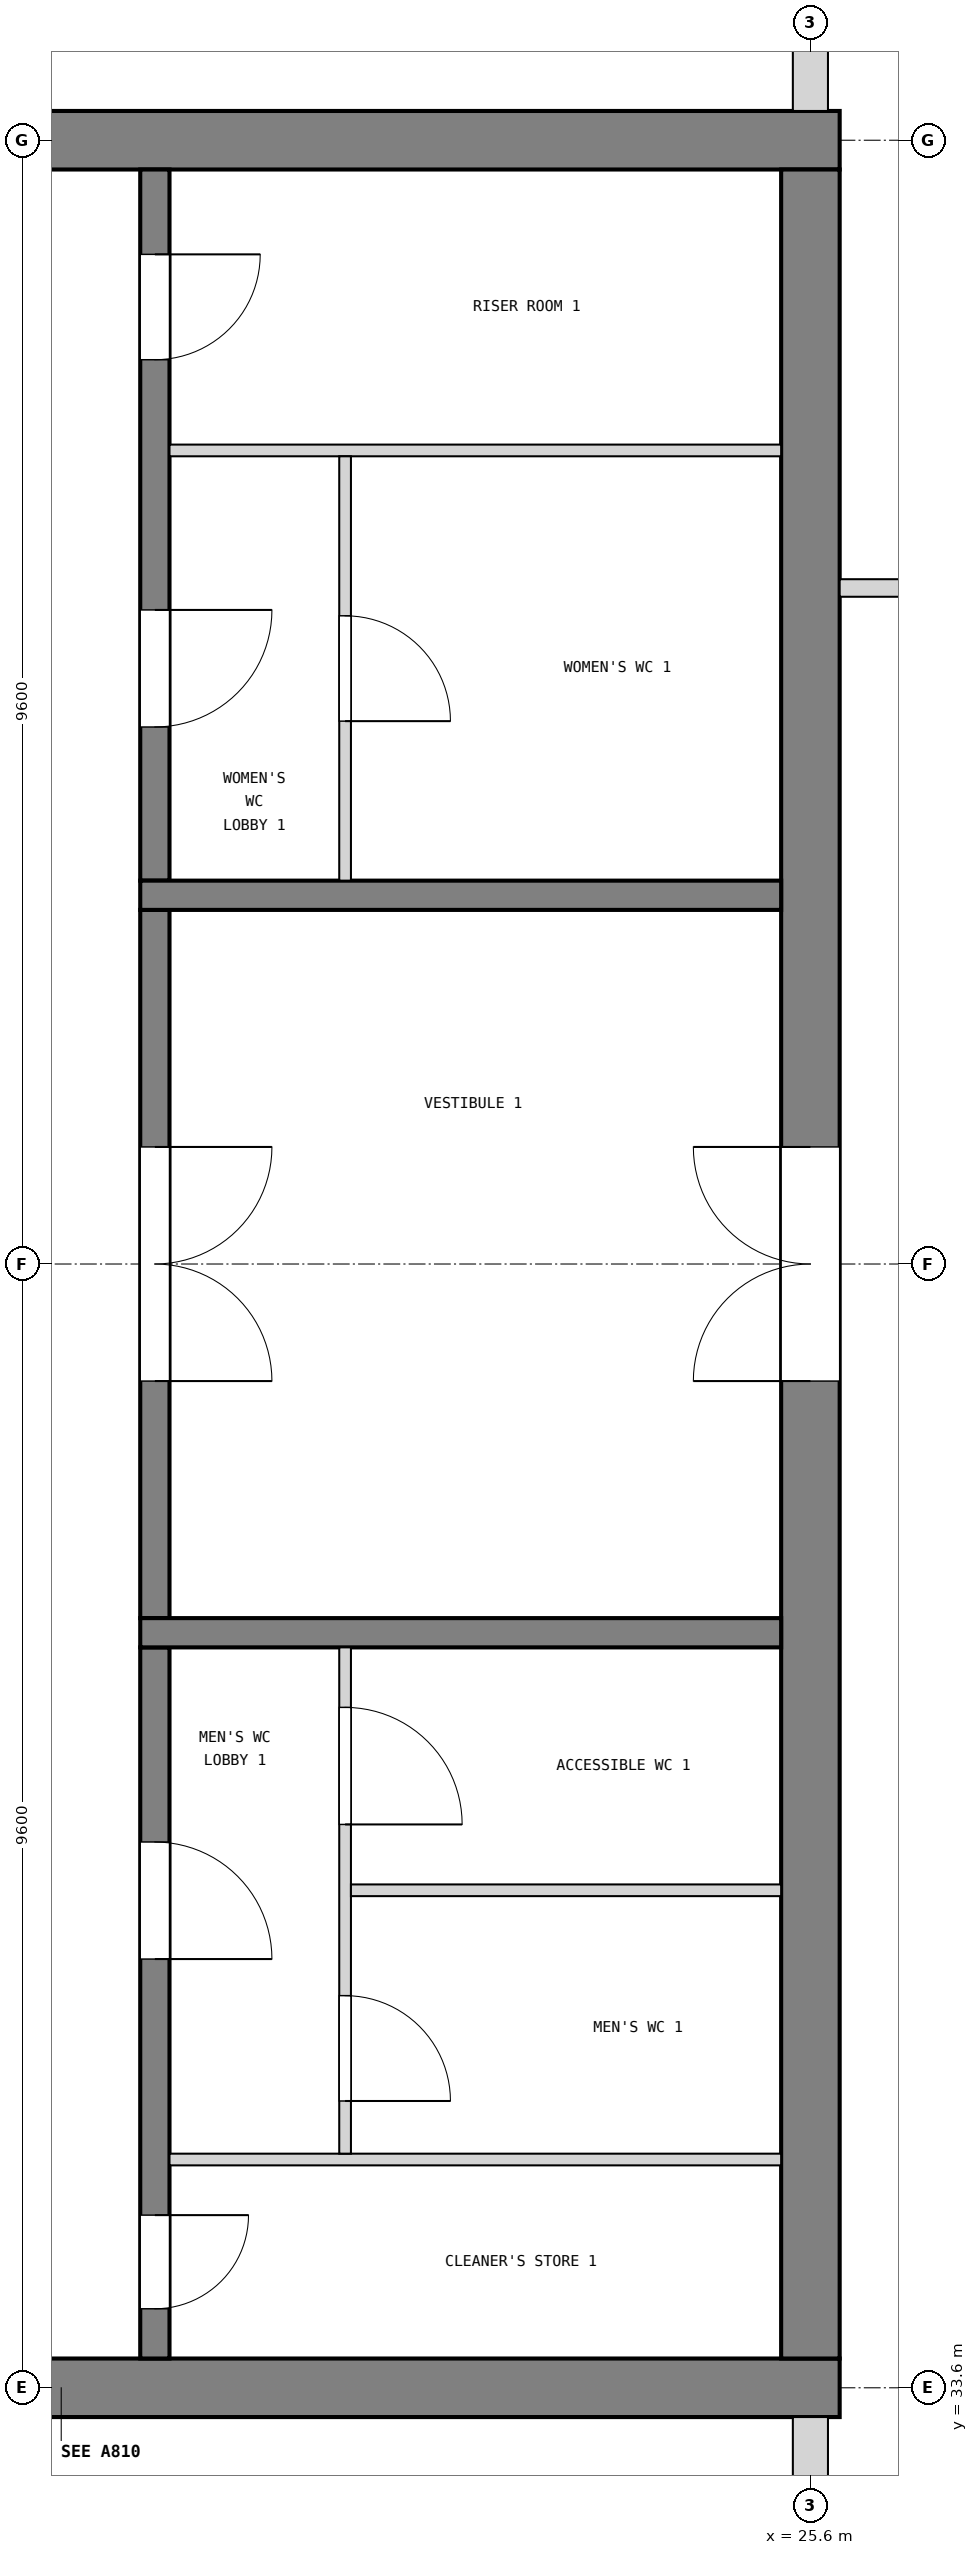
"""IFC4 building model, lengths in metres.
Left out: names, types, materials, properties, quantities, classifications, styles, units other than length and angle.
Written with IfcOpenShell. Run it as: python <this file> out.ifc"""

import sys

from ifc_helpers import new_model, si_unit, direction, frame, frame_2d, origin, place, context, subcontext, project, spatial, rectangle, extrude, element, fill, save


model = new_model("IFC4")
c1 = context("Model", 3, precision=1e-05, world=origin(), true_north=direction((0.0, 1.0)))
c2 = subcontext(c1, "Body", "Model", "MODEL_VIEW")
j1 = project(units=[si_unit("LENGTHUNIT", "METRE"), si_unit("PLANEANGLEUNIT", "RADIAN")], contexts=[c1])
p1 = place(None, origin())
s1 = spatial("IfcSite", under=j1, at=p1, CompositionType="ELEMENT")
p2 = place(p1, origin())
s2 = spatial("IfcBuilding", under=s1, at=p2, CompositionType="ELEMENT")
p3 = place(p2, frame((0.0, 0.0, 32.7)))
s3 = spatial("IfcBuildingStorey", under=s2, at=p3, CompositionType="ELEMENT", Elevation=32.7)
p4 = place(p3, frame((12.55, 52.8, 0.0), z_axis=(0.0, 0.0, 1.0), x_axis=(1.0, 0.0, 0.0)))
e1 = element("IfcWall", 1, at=p4, inside=s3, PredefinedType="SHEAR", context=c2, shape_type="SweptSolid", body=[
    extrude(rectangle(XDim=13.3, YDim=0.5, at=frame_2d((6.65, 0.0))), origin(), (0.0, 0.0, 1.0), 3.9),
])
p5 = place(p4, frame((1.85, 0.0, 1.0)))
e2 = element("IfcOpeningElement", 2, at=p5, cuts=e1, PredefinedType="OPENING", context=c2, shape_type="SweptSolid", body=[
    extrude(rectangle(XDim=0.4, YDim=2.0, at=frame_2d((0.2, 1.0))), frame((0.0, 0.26, 0.0), z_axis=(0.0, -1.0, 0.0), x_axis=(1.0, 0.0, 0.0)), (0.0, 0.0, 1.0), 0.52),
])
p6 = place(p3, frame((12.55, 33.6, 0.0), z_axis=(0.0, 0.0, 1.0), x_axis=(1.0, 0.0, 0.0)))
e3 = element("IfcWall", 3, at=p6, inside=s3, PredefinedType="SHEAR", context=c2, shape_type="SweptSolid", body=[
    extrude(rectangle(XDim=13.3, YDim=0.5, at=frame_2d((6.65, 0.0))), origin(), (0.0, 0.0, 1.0), 3.9),
])
p7 = place(p6, frame((1.85, 0.0, 1.0)))
e4 = element("IfcOpeningElement", 4, at=p7, cuts=e3, PredefinedType="OPENING", context=c2, shape_type="SweptSolid", body=[
    extrude(rectangle(XDim=0.4, YDim=2.0, at=frame_2d((0.2, 1.0))), frame((0.0, 0.26, 0.0), z_axis=(0.0, -1.0, 0.0), x_axis=(1.0, 0.0, 0.0)), (0.0, 0.0, 1.0), 0.52),
])
p8 = place(p3, frame((25.6, 33.85, 0.0), z_axis=(0.0, 0.0, 1.0), x_axis=(0.0, 1.0, 0.0)))
e5 = element("IfcWall", 5, at=p8, inside=s3, PredefinedType="SHEAR", context=c2, shape_type="SweptSolid", body=[
    extrude(rectangle(XDim=18.7, YDim=0.5, at=frame_2d((9.35, 0.0))), origin(), (0.0, 0.0, 1.0), 3.9),
])
p9 = place(p8, frame((8.35, 0.0, 0.0)))
e6 = element("IfcOpeningElement", 6, at=p9, cuts=e5, PredefinedType="OPENING", context=c2, shape_type="SweptSolid", body=[
    extrude(rectangle(XDim=2.0, YDim=2.1, at=frame_2d((1.0, 1.05))), frame((0.0, 0.26, 0.0), z_axis=(0.0, -1.0, 0.0), x_axis=(1.0, 0.0, 0.0)), (0.0, 0.0, 1.0), 0.52),
])
p10 = place(p3, frame((25.6, 31.0, 0.0), z_axis=(0.0, 0.0, 1.0), x_axis=(0.0, 1.0, 0.0)))
e7 = element("IfcWall", 7, at=p10, inside=s3, PredefinedType="SOLIDWALL", context=c2, shape_type="SweptSolid", body=[
    extrude(rectangle(XDim=2.35, YDim=0.3, at=frame_2d((1.175, 0.0))), origin(), (0.0, 0.0, 1.0), 2.88),
])
p11 = place(p3, frame((25.6, 53.05, 0.0), z_axis=(0.0, 0.0, 1.0), x_axis=(0.0, 1.0, 0.0)))
e8 = element("IfcWall", 8, at=p11, inside=s3, PredefinedType="SOLIDWALL", context=c2, shape_type="SweptSolid", body=[
    extrude(rectangle(XDim=2.35, YDim=0.3, at=frame_2d((1.175, 0.0))), origin(), (0.0, 0.0, 1.0), 2.88),
])
p12 = place(p3, frame((20.0, 33.85, 0.0), z_axis=(0.0, 0.0, 1.0), x_axis=(0.0, 1.0, 0.0)))
e9 = element("IfcWall", 9, at=p12, inside=s3, PredefinedType="SOLIDWALL", context=c2, shape_type="SweptSolid", body=[
    extrude(rectangle(XDim=6.075, YDim=0.25, at=frame_2d((3.038, 0.0))), origin(), (0.0, 0.0, 1.0), 3.6),
])
p13 = place(p12, frame((0.425, 0.0, 0.0)))
e10 = element("IfcOpeningElement", 10, at=p13, cuts=e9, PredefinedType="OPENING", context=c2, shape_type="SweptSolid", body=[
    extrude(rectangle(XDim=0.8, YDim=2.1, at=frame_2d((0.4, 1.05))), frame((0.0, 0.135, 0.0), z_axis=(0.0, -1.0, 0.0), x_axis=(1.0, 0.0, 0.0)), (0.0, 0.0, 1.0), 0.27),
])
p14 = place(p12, frame((3.413, 0.0, 0.0)))
e11 = element("IfcOpeningElement", 11, at=p14, cuts=e9, PredefinedType="OPENING", context=c2, shape_type="SweptSolid", body=[
    extrude(rectangle(XDim=1.0, YDim=2.1, at=frame_2d((0.5, 1.05))), frame((0.0, 0.135, 0.0), z_axis=(0.0, -1.0, 0.0), x_axis=(1.0, 0.0, 0.0)), (0.0, 0.0, 1.0), 0.27),
])
p15 = place(p3, frame((20.0, 40.175, 0.0), z_axis=(0.0, 0.0, 1.0), x_axis=(0.0, 1.0, 0.0)))
e12 = element("IfcWall", 12, at=p15, inside=s3, PredefinedType="SOLIDWALL", context=c2, shape_type="SweptSolid", body=[
    extrude(rectangle(XDim=6.05, YDim=0.25, at=frame_2d((3.025, 0.0))), origin(), (0.0, 0.0, 1.0), 3.6),
])
p16 = place(p15, frame((2.025, 0.0, 0.0)))
e13 = element("IfcOpeningElement", 13, at=p16, cuts=e12, PredefinedType="OPENING", context=c2, shape_type="SweptSolid", body=[
    extrude(rectangle(XDim=2.0, YDim=2.1, at=frame_2d((1.0, 1.05))), frame((0.0, 0.135, 0.0), z_axis=(0.0, -1.0, 0.0), x_axis=(1.0, 0.0, 0.0)), (0.0, 0.0, 1.0), 0.27),
])
p17 = place(p3, frame((20.0, 46.475, 0.0), z_axis=(0.0, 0.0, 1.0), x_axis=(0.0, 1.0, 0.0)))
e14 = element("IfcWall", 14, at=p17, inside=s3, PredefinedType="SOLIDWALL", context=c2, shape_type="SweptSolid", body=[
    extrude(rectangle(XDim=6.075, YDim=0.25, at=frame_2d((3.038, 0.0))), origin(), (0.0, 0.0, 1.0), 3.6),
])
p18 = place(p17, frame((1.312, 0.0, 0.0)))
e15 = element("IfcOpeningElement", 15, at=p18, cuts=e14, PredefinedType="OPENING", context=c2, shape_type="SweptSolid", body=[
    extrude(rectangle(XDim=1.0, YDim=2.1, at=frame_2d((0.5, 1.05))), frame((0.0, 0.135, 0.0), z_axis=(0.0, -1.0, 0.0), x_axis=(1.0, 0.0, 0.0)), (0.0, 0.0, 1.0), 0.27),
])
p19 = place(p17, frame((4.45, 0.0, 0.0)))
e16 = element("IfcOpeningElement", 16, at=p19, cuts=e14, PredefinedType="OPENING", context=c2, shape_type="SweptSolid", body=[
    extrude(rectangle(XDim=0.9, YDim=2.1, at=frame_2d((0.45, 1.05))), frame((0.0, 0.135, 0.0), z_axis=(0.0, -1.0, 0.0), x_axis=(1.0, 0.0, 0.0)), (0.0, 0.0, 1.0), 0.27),
])
for number, where, z_axis, x_axis in (
    (17, (19.875, 40.05, 0.0), (0.0, 0.0, 1.0), (1.0, 0.0, 0.0)),
    (18, (19.875, 46.35, 0.0), (0.0, 0.0, 1.0), (1.0, 0.0, 0.0)),
):
    element("IfcWall", number, at=place(p3, frame(where, z_axis=z_axis, x_axis=x_axis)), inside=s3, PredefinedType="SOLIDWALL", context=c2, shape_type="SweptSolid", body=[
        extrude(rectangle(XDim=5.475, YDim=0.25, at=frame_2d((2.738, 0.0))), origin(), (0.0, 0.0, 1.0), 3.6),
    ])
p20 = place(p3, frame((20.125, 35.55, 0.0), z_axis=(0.0, 0.0, 1.0), x_axis=(1.0, 0.0, 0.0)))
e19 = element("IfcWall", 19, at=p20, inside=s3, PredefinedType="PARTITIONING", context=c2, shape_type="SweptSolid", body=[
    extrude(rectangle(XDim=5.225, YDim=0.1, at=frame_2d((2.613, 0.0))), origin(), (0.0, 0.0, 1.0), 3.6),
])
p21 = place(p3, frame((21.625, 35.6, 0.0), z_axis=(0.0, 0.0, 1.0), x_axis=(0.0, 1.0, 0.0)))
e20 = element("IfcWall", 20, at=p21, inside=s3, PredefinedType="PARTITIONING", context=c2, shape_type="SweptSolid", body=[
    extrude(rectangle(XDim=4.325, YDim=0.1, at=frame_2d((2.163, 0.0))), origin(), (0.0, 0.0, 1.0), 3.6),
])
p22 = place(p21, frame((0.45, 0.0, 0.0)))
e21 = element("IfcOpeningElement", 21, at=p22, cuts=e20, PredefinedType="OPENING", context=c2, shape_type="SweptSolid", body=[
    extrude(rectangle(XDim=0.9, YDim=2.1, at=frame_2d((0.45, 1.05))), frame((0.0, 0.06, 0.0), z_axis=(0.0, -1.0, 0.0), x_axis=(1.0, 0.0, 0.0)), (0.0, 0.0, 1.0), 0.12),
])
p23 = place(p21, frame((2.812, 0.0, 0.0)))
e22 = element("IfcOpeningElement", 22, at=p23, cuts=e20, PredefinedType="OPENING", context=c2, shape_type="SweptSolid", body=[
    extrude(rectangle(XDim=1.0, YDim=2.1, at=frame_2d((0.5, 1.05))), frame((0.0, 0.06, 0.0), z_axis=(0.0, -1.0, 0.0), x_axis=(1.0, 0.0, 0.0)), (0.0, 0.0, 1.0), 0.12),
])
p24 = place(p3, frame((21.675, 37.85, 0.0), z_axis=(0.0, 0.0, 1.0), x_axis=(1.0, 0.0, 0.0)))
e23 = element("IfcWall", 23, at=p24, inside=s3, PredefinedType="PARTITIONING", context=c2, shape_type="SweptSolid", body=[
    extrude(rectangle(XDim=3.675, YDim=0.1, at=frame_2d((1.837, 0.0))), origin(), (0.0, 0.0, 1.0), 3.6),
])
p25 = place(p3, frame((20.125, 50.15, 0.0), z_axis=(0.0, 0.0, 1.0), x_axis=(1.0, 0.0, 0.0)))
e24 = element("IfcWall", 24, at=p25, inside=s3, PredefinedType="PARTITIONING", context=c2, shape_type="SweptSolid", body=[
    extrude(rectangle(XDim=5.225, YDim=0.1, at=frame_2d((2.613, 0.0))), origin(), (0.0, 0.0, 1.0), 3.6),
])
p26 = place(p3, frame((21.625, 46.475, 0.0), z_axis=(0.0, 0.0, 1.0), x_axis=(0.0, 1.0, 0.0)))
e25 = element("IfcWall", 25, at=p26, inside=s3, PredefinedType="PARTITIONING", context=c2, shape_type="SweptSolid", body=[
    extrude(rectangle(XDim=3.625, YDim=0.1, at=frame_2d((1.812, 0.0))), origin(), (0.0, 0.0, 1.0), 3.6),
])
p27 = place(p26, frame((1.363, 0.0, 0.0)))
e26 = element("IfcOpeningElement", 26, at=p27, cuts=e25, PredefinedType="OPENING", context=c2, shape_type="SweptSolid", body=[
    extrude(rectangle(XDim=0.9, YDim=2.1, at=frame_2d((0.45, 1.05))), frame((0.0, 0.06, 0.0), z_axis=(0.0, -1.0, 0.0), x_axis=(1.0, 0.0, 0.0)), (0.0, 0.0, 1.0), 0.12),
])
p28 = place(p3, frame((25.85, 48.975, 0.0), z_axis=(0.0, 0.0, 1.0), x_axis=(1.0, 0.0, 0.0)))
e27 = element("IfcWall", 27, at=p28, inside=s3, PredefinedType="PARTITIONING", context=c2, shape_type="SweptSolid", body=[
    extrude(rectangle(XDim=5.97, YDim=0.15, at=frame_2d((2.985, 0.0))), origin(), (0.0, 0.0, 1.0), 3.68),
])
p29 = place(p28, frame((2.45, 0.0, 0.0)))
e28 = element("IfcOpeningElement", 28, at=p29, cuts=e27, PredefinedType="OPENING", context=c2, shape_type="SweptSolid", body=[
    extrude(rectangle(XDim=1.0, YDim=2.1, at=frame_2d((0.5, 1.05))), frame((0.0, 0.085, 0.0), z_axis=(0.0, -1.0, 0.0), x_axis=(1.0, 0.0, 0.0)), (0.0, 0.0, 1.0), 0.17),
])
p30 = place(p16, frame((2.0, 0.0, 0.0), z_axis=(0.0, 0.0, 1.0), x_axis=(-1.0, 0.0, 0.0)))
e29 = element("IfcDoor", 29, at=p30, inside=s3, OperationType="DOUBLE_DOOR_SINGLE_SWING", PredefinedType="DOOR", context=c2, shape_type="SweptSolid", body=[
    extrude(rectangle(XDim=2.0, YDim=2.1, at=frame_2d((1.0, 1.05))), frame((0.0, 0.025, 0.0), z_axis=(0.0, -1.0, 0.0), x_axis=(1.0, 0.0, 0.0)), (0.0, 0.0, 1.0), 0.05),
])
fill(e13, e29)
p31 = place(p9, origin())
e30 = element("IfcDoor", 30, at=p31, inside=s3, OperationType="DOUBLE_DOOR_SINGLE_SWING", PredefinedType="DOOR", context=c2, shape_type="SweptSolid", body=[
    extrude(rectangle(XDim=2.0, YDim=2.1, at=frame_2d((1.0, 1.05))), frame((0.0, 0.025, 0.0), z_axis=(0.0, -1.0, 0.0), x_axis=(1.0, 0.0, 0.0)), (0.0, 0.0, 1.0), 0.05),
])
fill(e6, e30)
p32 = place(p13, frame((0.8, 0.0, 0.0), z_axis=(0.0, 0.0, 1.0), x_axis=(-1.0, 0.0, 0.0)))
e31 = element("IfcDoor", 31, at=p32, inside=s3, OperationType="SINGLE_SWING_LEFT", PredefinedType="DOOR", context=c2, shape_type="SweptSolid", body=[
    extrude(rectangle(XDim=0.8, YDim=2.1, at=frame_2d((0.4, 1.05))), frame((0.0, 0.025, 0.0), z_axis=(0.0, -1.0, 0.0), x_axis=(1.0, 0.0, 0.0)), (0.0, 0.0, 1.0), 0.05),
])
fill(e10, e31)
p33 = place(p14, frame((1.0, 0.0, 0.0), z_axis=(0.0, 0.0, 1.0), x_axis=(-1.0, 0.0, 0.0)))
e32 = element("IfcDoor", 32, at=p33, inside=s3, OperationType="SINGLE_SWING_RIGHT", PredefinedType="DOOR", context=c2, shape_type="SweptSolid", body=[
    extrude(rectangle(XDim=1.0, YDim=2.1, at=frame_2d((0.5, 1.05))), frame((0.0, 0.025, 0.0), z_axis=(0.0, -1.0, 0.0), x_axis=(1.0, 0.0, 0.0)), (0.0, 0.0, 1.0), 0.05),
])
fill(e11, e32)
p34 = place(p22, frame((0.9, 0.0, 0.0), z_axis=(0.0, 0.0, 1.0), x_axis=(-1.0, 0.0, 0.0)))
e33 = element("IfcDoor", 33, at=p34, inside=s3, OperationType="SINGLE_SWING_RIGHT", PredefinedType="DOOR", context=c2, shape_type="SweptSolid", body=[
    extrude(rectangle(XDim=0.9, YDim=2.1, at=frame_2d((0.45, 1.05))), frame((0.0, 0.025, 0.0), z_axis=(0.0, -1.0, 0.0), x_axis=(1.0, 0.0, 0.0)), (0.0, 0.0, 1.0), 0.05),
])
fill(e21, e33)
p35 = place(p23, frame((1.0, 0.0, 0.0), z_axis=(0.0, 0.0, 1.0), x_axis=(-1.0, 0.0, 0.0)))
e34 = element("IfcDoor", 34, at=p35, inside=s3, OperationType="SINGLE_SWING_RIGHT", PredefinedType="DOOR", context=c2, shape_type="SweptSolid", body=[
    extrude(rectangle(XDim=1.0, YDim=2.1, at=frame_2d((0.5, 1.05))), frame((0.0, 0.025, 0.0), z_axis=(0.0, -1.0, 0.0), x_axis=(1.0, 0.0, 0.0)), (0.0, 0.0, 1.0), 0.05),
])
fill(e22, e34)
p36 = place(p18, frame((1.0, 0.0, 0.0), z_axis=(0.0, 0.0, 1.0), x_axis=(-1.0, 0.0, 0.0)))
e35 = element("IfcDoor", 35, at=p36, inside=s3, OperationType="SINGLE_SWING_LEFT", PredefinedType="DOOR", context=c2, shape_type="SweptSolid", body=[
    extrude(rectangle(XDim=1.0, YDim=2.1, at=frame_2d((0.5, 1.05))), frame((0.0, 0.025, 0.0), z_axis=(0.0, -1.0, 0.0), x_axis=(1.0, 0.0, 0.0)), (0.0, 0.0, 1.0), 0.05),
])
fill(e15, e35)
p37 = place(p27, frame((0.9, 0.0, 0.0), z_axis=(0.0, 0.0, 1.0), x_axis=(-1.0, 0.0, 0.0)))
e36 = element("IfcDoor", 36, at=p37, inside=s3, OperationType="SINGLE_SWING_RIGHT", PredefinedType="DOOR", context=c2, shape_type="SweptSolid", body=[
    extrude(rectangle(XDim=0.9, YDim=2.1, at=frame_2d((0.45, 1.05))), frame((0.0, 0.025, 0.0), z_axis=(0.0, -1.0, 0.0), x_axis=(1.0, 0.0, 0.0)), (0.0, 0.0, 1.0), 0.05),
])
fill(e26, e36)
p38 = place(p19, frame((0.9, 0.0, 0.0), z_axis=(0.0, 0.0, 1.0), x_axis=(-1.0, 0.0, 0.0)))
e37 = element("IfcDoor", 37, at=p38, inside=s3, OperationType="SINGLE_SWING_LEFT", PredefinedType="DOOR", context=c2, shape_type="SweptSolid", body=[
    extrude(rectangle(XDim=0.9, YDim=2.1, at=frame_2d((0.45, 1.05))), frame((0.0, 0.025, 0.0), z_axis=(0.0, -1.0, 0.0), x_axis=(1.0, 0.0, 0.0)), (0.0, 0.0, 1.0), 0.05),
])
fill(e16, e37)
save(model, sys.argv[1])
